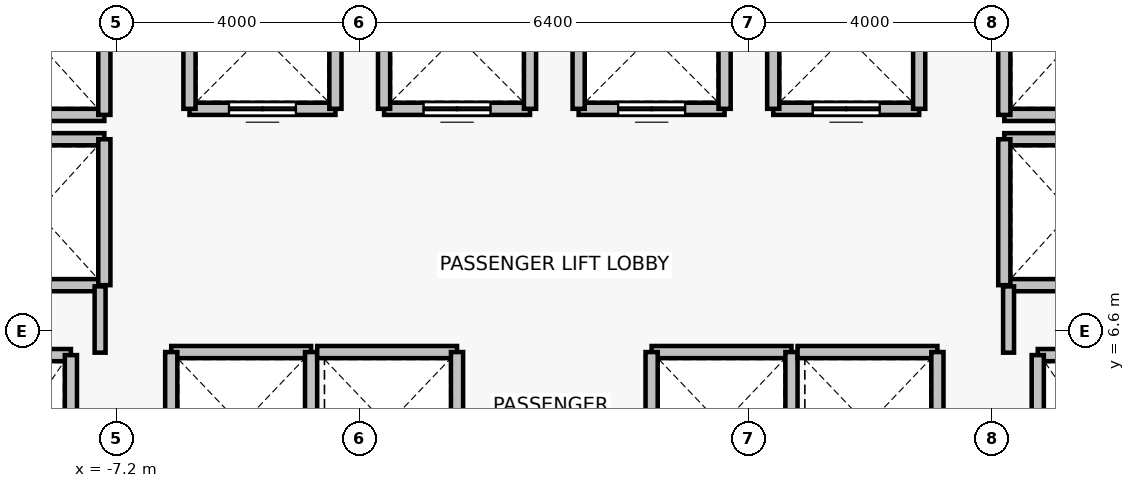
"""IFC4 building model, lengths in metres.
Left out: names, types, materials, properties, quantities, classifications, styles, units other than length and angle.
Written with IfcOpenShell. Run it as: python <this file> out.ifc"""

import sys

from ifc_helpers import new_model, si_unit, direction, frame, frame_2d, origin, place, context, subcontext, project, spatial, rectangle, extrude, source, transform, mapped, element, fill, save


model = new_model("IFC4")
c1 = context("Model", 3, precision=1e-05, world=origin(), true_north=direction((0.0, 1.0)))
c2 = subcontext(c1, "Body", "Model", "MODEL_VIEW")
j1 = project(units=[si_unit("LENGTHUNIT", "METRE"), si_unit("PLANEANGLEUNIT", "RADIAN")], contexts=[c1])
p1 = place(None, origin())
s1 = spatial("IfcSite", under=j1, at=p1, CompositionType="ELEMENT")
p2 = place(p1, origin())
s2 = spatial("IfcBuilding", under=s1, at=p2, CompositionType="ELEMENT")
p3 = place(p2, frame((0.0, 0.0, 76.9)))
s3 = spatial("IfcBuildingStorey", under=s2, at=p3, CompositionType="ELEMENT", Elevation=76.9)
p4 = place(p3, frame((-9.95, 6.2, 0.0), z_axis=(0.0, 0.0, 1.0), x_axis=(1.0, 0.0, 0.0)))
e1 = element("IfcWall", 1, at=p4, inside=s3, PredefinedType="SOLIDWALL", context=c2, shape_type="SweptSolid", body=[
    extrude(rectangle(XDim=2.0, YDim=0.2, at=frame_2d((1.0, 0.0))), origin(), (0.0, 0.0, 1.0), 3.05),
])
p5 = place(p3, frame((-7.95, 6.2, 0.0), z_axis=(0.0, 0.0, 1.0), x_axis=(0.0, -1.0, 0.0)))
e2 = element("IfcWall", 2, at=p5, inside=s3, PredefinedType="SOLIDWALL", context=c2, shape_type="SweptSolid", body=[
    extrude(rectangle(XDim=2.8, YDim=0.2, at=frame_2d((1.4, 0.0))), origin(), (0.0, 0.0, 1.0), 3.05),
])
p6 = place(p3, frame((7.95, 6.2, 0.0), z_axis=(0.0, 0.0, 1.0), x_axis=(1.0, 0.0, 0.0)))
e3 = element("IfcWall", 3, at=p6, inside=s3, PredefinedType="SOLIDWALL", context=c2, shape_type="SweptSolid", body=[
    extrude(rectangle(XDim=2.0, YDim=0.2, at=frame_2d((1.0, 0.0))), origin(), (0.0, 0.0, 1.0), 3.05),
])
p7 = place(p3, frame((7.95, 3.4, 0.0), z_axis=(0.0, 0.0, 1.0), x_axis=(0.0, 1.0, 0.0)))
e4 = element("IfcWall", 4, at=p7, inside=s3, PredefinedType="SOLIDWALL", context=c2, shape_type="SweptSolid", body=[
    extrude(rectangle(XDim=2.8, YDim=0.2, at=frame_2d((1.4, 0.0))), origin(), (0.0, 0.0, 1.0), 3.05),
])
p8 = place(p3, frame((-3.6, 10.25, 0.0), z_axis=(0.0, 0.0, 1.0), x_axis=(-1.0, 0.0, 0.0)))
e5 = element("IfcWall", 5, at=p8, inside=s3, PredefinedType="SOLIDWALL", context=c2, shape_type="SweptSolid", body=[
    extrude(rectangle(XDim=2.4, YDim=0.2, at=frame_2d((1.2, 0.0))), origin(), (0.0, 0.0, 1.0), 3.05),
])
p9 = place(p8, frame((0.65, 0.0, 0.0)))
e6 = element("IfcOpeningElement", 6, at=p9, cuts=e5, PredefinedType="OPENING", context=c2, shape_type="SweptSolid", body=[
    extrude(rectangle(XDim=1.1, YDim=2.2, at=frame_2d((0.55, 1.1))), frame((0.0, 0.11, 0.0), z_axis=(0.0, -1.0, 0.0), x_axis=(1.0, 0.0, 0.0)), (0.0, 0.0, 1.0), 0.22),
])
for number, where, z_axis, x_axis in (
    (7, (-6.0, 10.25, 0.0), (0.0, 0.0, 1.0), (0.0, 1.0, 0.0)),
    (8, (-3.6, 12.65, 0.0), (0.0, 0.0, 1.0), (0.0, -1.0, 0.0)),
):
    element("IfcWall", number, at=place(p3, frame(where, z_axis=z_axis, x_axis=x_axis)), inside=s3, PredefinedType="SOLIDWALL", context=c2, shape_type="SweptSolid", body=[
        extrude(rectangle(XDim=2.4, YDim=0.2, at=frame_2d((1.2, 0.0))), origin(), (0.0, 0.0, 1.0), 3.05),
    ])
p10 = place(p3, frame((-0.4, 10.25, 0.0), z_axis=(0.0, 0.0, 1.0), x_axis=(-1.0, 0.0, 0.0)))
e9 = element("IfcWall", 9, at=p10, inside=s3, PredefinedType="SOLIDWALL", context=c2, shape_type="SweptSolid", body=[
    extrude(rectangle(XDim=2.4, YDim=0.2, at=frame_2d((1.2, 0.0))), origin(), (0.0, 0.0, 1.0), 3.05),
])
p11 = place(p10, frame((0.65, 0.0, 0.0)))
e10 = element("IfcOpeningElement", 10, at=p11, cuts=e9, PredefinedType="OPENING", context=c2, shape_type="SweptSolid", body=[
    extrude(rectangle(XDim=1.1, YDim=2.2, at=frame_2d((0.55, 1.1))), frame((0.0, 0.11, 0.0), z_axis=(0.0, -1.0, 0.0), x_axis=(1.0, 0.0, 0.0)), (0.0, 0.0, 1.0), 0.22),
])
for number, where, z_axis, x_axis in (
    (11, (-2.8, 10.25, 0.0), (0.0, 0.0, 1.0), (0.0, 1.0, 0.0)),
    (12, (-0.4, 12.65, 0.0), (0.0, 0.0, 1.0), (0.0, -1.0, 0.0)),
):
    element("IfcWall", number, at=place(p3, frame(where, z_axis=z_axis, x_axis=x_axis)), inside=s3, PredefinedType="SOLIDWALL", context=c2, shape_type="SweptSolid", body=[
        extrude(rectangle(XDim=2.4, YDim=0.2, at=frame_2d((1.2, 0.0))), origin(), (0.0, 0.0, 1.0), 3.05),
    ])
p12 = place(p3, frame((2.8, 10.25, 0.0), z_axis=(0.0, 0.0, 1.0), x_axis=(-1.0, 0.0, 0.0)))
e13 = element("IfcWall", 13, at=p12, inside=s3, PredefinedType="SOLIDWALL", context=c2, shape_type="SweptSolid", body=[
    extrude(rectangle(XDim=2.4, YDim=0.2, at=frame_2d((1.2, 0.0))), origin(), (0.0, 0.0, 1.0), 3.05),
])
p13 = place(p12, frame((0.65, 0.0, 0.0)))
e14 = element("IfcOpeningElement", 14, at=p13, cuts=e13, PredefinedType="OPENING", context=c2, shape_type="SweptSolid", body=[
    extrude(rectangle(XDim=1.1, YDim=2.2, at=frame_2d((0.55, 1.1))), frame((0.0, 0.11, 0.0), z_axis=(0.0, -1.0, 0.0), x_axis=(1.0, 0.0, 0.0)), (0.0, 0.0, 1.0), 0.22),
])
for number, where, z_axis, x_axis in (
    (15, (0.4, 10.25, 0.0), (0.0, 0.0, 1.0), (0.0, 1.0, 0.0)),
    (16, (2.8, 12.65, 0.0), (0.0, 0.0, 1.0), (0.0, -1.0, 0.0)),
):
    element("IfcWall", number, at=place(p3, frame(where, z_axis=z_axis, x_axis=x_axis)), inside=s3, PredefinedType="SOLIDWALL", context=c2, shape_type="SweptSolid", body=[
        extrude(rectangle(XDim=2.4, YDim=0.2, at=frame_2d((1.2, 0.0))), origin(), (0.0, 0.0, 1.0), 3.05),
    ])
p14 = place(p3, frame((6.0, 10.25, 0.0), z_axis=(0.0, 0.0, 1.0), x_axis=(-1.0, 0.0, 0.0)))
e17 = element("IfcWall", 17, at=p14, inside=s3, PredefinedType="SOLIDWALL", context=c2, shape_type="SweptSolid", body=[
    extrude(rectangle(XDim=2.4, YDim=0.2, at=frame_2d((1.2, 0.0))), origin(), (0.0, 0.0, 1.0), 3.05),
])
p15 = place(p14, frame((0.65, 0.0, 0.0)))
e18 = element("IfcOpeningElement", 18, at=p15, cuts=e17, PredefinedType="OPENING", context=c2, shape_type="SweptSolid", body=[
    extrude(rectangle(XDim=1.1, YDim=2.2, at=frame_2d((0.55, 1.1))), frame((0.0, 0.11, 0.0), z_axis=(0.0, -1.0, 0.0), x_axis=(1.0, 0.0, 0.0)), (0.0, 0.0, 1.0), 0.22),
])
for number, where, z_axis, x_axis in (
    (19, (3.6, 10.25, 0.0), (0.0, 0.0, 1.0), (0.0, 1.0, 0.0)),
    (20, (6.0, 12.65, 0.0), (0.0, 0.0, 1.0), (0.0, -1.0, 0.0)),
):
    element("IfcWall", number, at=place(p3, frame(where, z_axis=z_axis, x_axis=x_axis)), inside=s3, PredefinedType="SOLIDWALL", context=c2, shape_type="SweptSolid", body=[
        extrude(rectangle(XDim=2.4, YDim=0.2, at=frame_2d((1.2, 0.0))), origin(), (0.0, 0.0, 1.0), 3.05),
    ])
p16 = place(p3, frame((-6.3, 6.25, 0.0), z_axis=(0.0, 0.0, 1.0), x_axis=(1.0, 0.0, 0.0)))
e21 = element("IfcWall", 21, at=p16, inside=s3, PredefinedType="SOLIDWALL", context=c2, shape_type="SweptSolid", body=[
    extrude(rectangle(XDim=2.3, YDim=0.2, at=frame_2d((1.15, 0.0))), origin(), (0.0, 0.0, 1.0), 3.05),
])
for number, where, z_axis, x_axis in (
    (22, (-6.3, 3.85, 0.0), (0.0, 0.0, 1.0), (0.0, 1.0, 0.0)),
    (23, (-4.0, 6.25, 0.0), (0.0, 0.0, 1.0), (0.0, -1.0, 0.0)),
):
    element("IfcWall", number, at=place(p3, frame(where, z_axis=z_axis, x_axis=x_axis)), inside=s3, PredefinedType="SOLIDWALL", context=c2, shape_type="SweptSolid", body=[
        extrude(rectangle(XDim=2.4, YDim=0.2, at=frame_2d((1.2, 0.0))), origin(), (0.0, 0.0, 1.0), 3.05),
    ])
p17 = place(p3, frame((-3.9, 6.25, 0.0), z_axis=(0.0, 0.0, 1.0), x_axis=(1.0, 0.0, 0.0)))
e24 = element("IfcWall", 24, at=p17, inside=s3, PredefinedType="SOLIDWALL", context=c2, shape_type="SweptSolid", body=[
    extrude(rectangle(XDim=2.3, YDim=0.2, at=frame_2d((1.15, 0.0))), origin(), (0.0, 0.0, 1.0), 3.05),
])
p18 = place(p3, frame((-1.6, 6.25, 0.0), z_axis=(0.0, 0.0, 1.0), x_axis=(0.0, -1.0, 0.0)))
e25 = element("IfcWall", 25, at=p18, inside=s3, PredefinedType="SOLIDWALL", context=c2, shape_type="SweptSolid", body=[
    extrude(rectangle(XDim=2.4, YDim=0.2, at=frame_2d((1.2, 0.0))), origin(), (0.0, 0.0, 1.0), 3.05),
])
p19 = place(p3, frame((1.6, 6.25, 0.0), z_axis=(0.0, 0.0, 1.0), x_axis=(1.0, 0.0, 0.0)))
e26 = element("IfcWall", 26, at=p19, inside=s3, PredefinedType="SOLIDWALL", context=c2, shape_type="SweptSolid", body=[
    extrude(rectangle(XDim=2.3, YDim=0.2, at=frame_2d((1.15, 0.0))), origin(), (0.0, 0.0, 1.0), 3.05),
])
for number, where, z_axis, x_axis in (
    (27, (1.6, 3.85, 0.0), (0.0, 0.0, 1.0), (0.0, 1.0, 0.0)),
    (28, (3.9, 6.25, 0.0), (0.0, 0.0, 1.0), (0.0, -1.0, 0.0)),
):
    element("IfcWall", number, at=place(p3, frame(where, z_axis=z_axis, x_axis=x_axis)), inside=s3, PredefinedType="SOLIDWALL", context=c2, shape_type="SweptSolid", body=[
        extrude(rectangle(XDim=2.4, YDim=0.2, at=frame_2d((1.2, 0.0))), origin(), (0.0, 0.0, 1.0), 3.05),
    ])
p20 = place(p3, frame((4.0, 6.25, 0.0), z_axis=(0.0, 0.0, 1.0), x_axis=(1.0, 0.0, 0.0)))
e29 = element("IfcWall", 29, at=p20, inside=s3, PredefinedType="SOLIDWALL", context=c2, shape_type="SweptSolid", body=[
    extrude(rectangle(XDim=2.3, YDim=0.2, at=frame_2d((1.15, 0.0))), origin(), (0.0, 0.0, 1.0), 3.05),
])
p21 = place(p3, frame((6.3, 6.25, 0.0), z_axis=(0.0, 0.0, 1.0), x_axis=(0.0, -1.0, 0.0)))
e30 = element("IfcWall", 30, at=p21, inside=s3, PredefinedType="SOLIDWALL", context=c2, shape_type="SweptSolid", body=[
    extrude(rectangle(XDim=2.4, YDim=0.2, at=frame_2d((1.2, 0.0))), origin(), (0.0, 0.0, 1.0), 3.05),
])
for number, where, z_axis, x_axis in (
    (31, (-7.4, 7.35, 0.0), (0.0, 0.0, 1.0), (-1.0, 0.0, 0.0)),
    (32, (-9.6, 9.75, 0.0), (0.0, 0.0, 1.0), (1.0, 0.0, 0.0)),
):
    element("IfcWall", number, at=place(p3, frame(where, z_axis=z_axis, x_axis=x_axis)), inside=s3, PredefinedType="SOLIDWALL", context=c2, shape_type="SweptSolid", body=[
        extrude(rectangle(XDim=2.2, YDim=0.2, at=frame_2d((1.1, 0.0))), origin(), (0.0, 0.0, 1.0), 2.44),
    ])
p22 = place(p3, frame((-7.4, 9.75, 0.0), z_axis=(0.0, 0.0, 1.0), x_axis=(0.0, -1.0, 0.0)))
e33 = element("IfcWall", 33, at=p22, inside=s3, PredefinedType="SOLIDWALL", context=c2, shape_type="SweptSolid", body=[
    extrude(rectangle(XDim=2.4, YDim=0.2, at=frame_2d((1.2, 0.0))), origin(), (0.0, 0.0, 1.0), 2.44),
])
p23 = place(p3, frame((-7.4, 10.15, 0.0), z_axis=(0.0, 0.0, 1.0), x_axis=(-1.0, 0.0, 0.0)))
e34 = element("IfcWall", 34, at=p23, inside=s3, PredefinedType="SOLIDWALL", context=c2, shape_type="SweptSolid", body=[
    extrude(rectangle(XDim=2.2, YDim=0.2, at=frame_2d((1.1, 0.0))), origin(), (0.0, 0.0, 1.0), 2.44),
])
p24 = place(p3, frame((-7.4, 12.55, 0.0), z_axis=(0.0, 0.0, 1.0), x_axis=(0.0, -1.0, 0.0)))
e35 = element("IfcWall", 35, at=p24, inside=s3, PredefinedType="SOLIDWALL", context=c2, shape_type="SweptSolid", body=[
    extrude(rectangle(XDim=2.4, YDim=0.2, at=frame_2d((1.2, 0.0))), origin(), (0.0, 0.0, 1.0), 2.44),
])
for number, where, z_axis, x_axis in (
    (36, (9.6, 7.35, 0.0), (0.0, 0.0, 1.0), (-1.0, 0.0, 0.0)),
    (37, (7.4, 9.75, 0.0), (0.0, 0.0, 1.0), (1.0, 0.0, 0.0)),
):
    element("IfcWall", number, at=place(p3, frame(where, z_axis=z_axis, x_axis=x_axis)), inside=s3, PredefinedType="SOLIDWALL", context=c2, shape_type="SweptSolid", body=[
        extrude(rectangle(XDim=2.2, YDim=0.2, at=frame_2d((1.1, 0.0))), origin(), (0.0, 0.0, 1.0), 2.44),
    ])
p25 = place(p3, frame((7.4, 7.35, 0.0), z_axis=(0.0, 0.0, 1.0), x_axis=(0.0, 1.0, 0.0)))
e38 = element("IfcWall", 38, at=p25, inside=s3, PredefinedType="SOLIDWALL", context=c2, shape_type="SweptSolid", body=[
    extrude(rectangle(XDim=2.4, YDim=0.2, at=frame_2d((1.2, 0.0))), origin(), (0.0, 0.0, 1.0), 2.44),
])
p26 = place(p3, frame((9.6, 10.15, 0.0), z_axis=(0.0, 0.0, 1.0), x_axis=(-1.0, 0.0, 0.0)))
e39 = element("IfcWall", 39, at=p26, inside=s3, PredefinedType="SOLIDWALL", context=c2, shape_type="SweptSolid", body=[
    extrude(rectangle(XDim=2.2, YDim=0.2, at=frame_2d((1.1, 0.0))), origin(), (0.0, 0.0, 1.0), 2.44),
])
p27 = place(p3, frame((7.4, 10.15, 0.0), z_axis=(0.0, 0.0, 1.0), x_axis=(0.0, 1.0, 0.0)))
e40 = element("IfcWall", 40, at=p27, inside=s3, PredefinedType="SOLIDWALL", context=c2, shape_type="SweptSolid", body=[
    extrude(rectangle(XDim=2.4, YDim=0.2, at=frame_2d((1.2, 0.0))), origin(), (0.0, 0.0, 1.0), 2.44),
])
for number, where, z_axis, x_axis in (
    (41, (-7.47, 7.33, 0.0), (0.0, 0.0, 1.0), (0.0, -1.0, 0.0)),
    (42, (7.47, 6.24, 0.0), (0.0, 0.0, 1.0), (0.0, 1.0, 0.0)),
):
    element("IfcWall", number, at=place(p3, frame(where, z_axis=z_axis, x_axis=x_axis)), inside=s3, PredefinedType="PARTITIONING", context=c2, shape_type="SweptSolid", body=[
        extrude(rectangle(XDim=1.09, YDim=0.18, at=frame_2d((0.545, 0.0))), origin(), (0.0, 0.0, 1.0), 2.44),
    ])
m1 = source(origin(), c2, "Body", "SweptSolid", [
    extrude(rectangle(XDim=1.1, YDim=2.2, at=frame_2d((0.55, 1.1))), frame((0.0, 0.025, 0.0), z_axis=(0.0, -1.0, 0.0), x_axis=(1.0, 0.0, 0.0)), (0.0, 0.0, 1.0), 0.05),
])
p28 = place(p9, origin())
e43 = element("IfcDoor", 43, at=p28, inside=s3, OperationType="DOUBLE_DOOR_SLIDING", PredefinedType="DOOR", context=c2, shape_type="MappedRepresentation", body=[
    mapped(m1, transform((0.0, 0.0, 0.0), x_axis=(1.0, 0.0, 0.0), y_axis=(0.0, 1.0, 0.0), z_axis=(0.0, 0.0, 1.0), scale=1.0)),
])
fill(e6, e43)
p29 = place(p11, origin())
e44 = element("IfcDoor", 44, at=p29, inside=s3, OperationType="DOUBLE_DOOR_SLIDING", PredefinedType="DOOR", context=c2, shape_type="MappedRepresentation", body=[
    mapped(m1, transform((0.0, 0.0, 0.0), x_axis=(1.0, 0.0, 0.0), y_axis=(0.0, 1.0, 0.0), z_axis=(0.0, 0.0, 1.0), scale=1.0)),
])
fill(e10, e44)
p30 = place(p13, origin())
e45 = element("IfcDoor", 45, at=p30, inside=s3, OperationType="DOUBLE_DOOR_SLIDING", PredefinedType="DOOR", context=c2, shape_type="MappedRepresentation", body=[
    mapped(m1, transform((0.0, 0.0, 0.0), x_axis=(1.0, 0.0, 0.0), y_axis=(0.0, 1.0, 0.0), z_axis=(0.0, 0.0, 1.0), scale=1.0)),
])
fill(e14, e45)
p31 = place(p15, origin())
e46 = element("IfcDoor", 46, at=p31, inside=s3, OperationType="DOUBLE_DOOR_SLIDING", PredefinedType="DOOR", context=c2, shape_type="MappedRepresentation", body=[
    mapped(m1, transform((0.0, 0.0, 0.0), x_axis=(1.0, 0.0, 0.0), y_axis=(0.0, 1.0, 0.0), z_axis=(0.0, 0.0, 1.0), scale=1.0)),
])
fill(e18, e46)
save(model, sys.argv[1])
